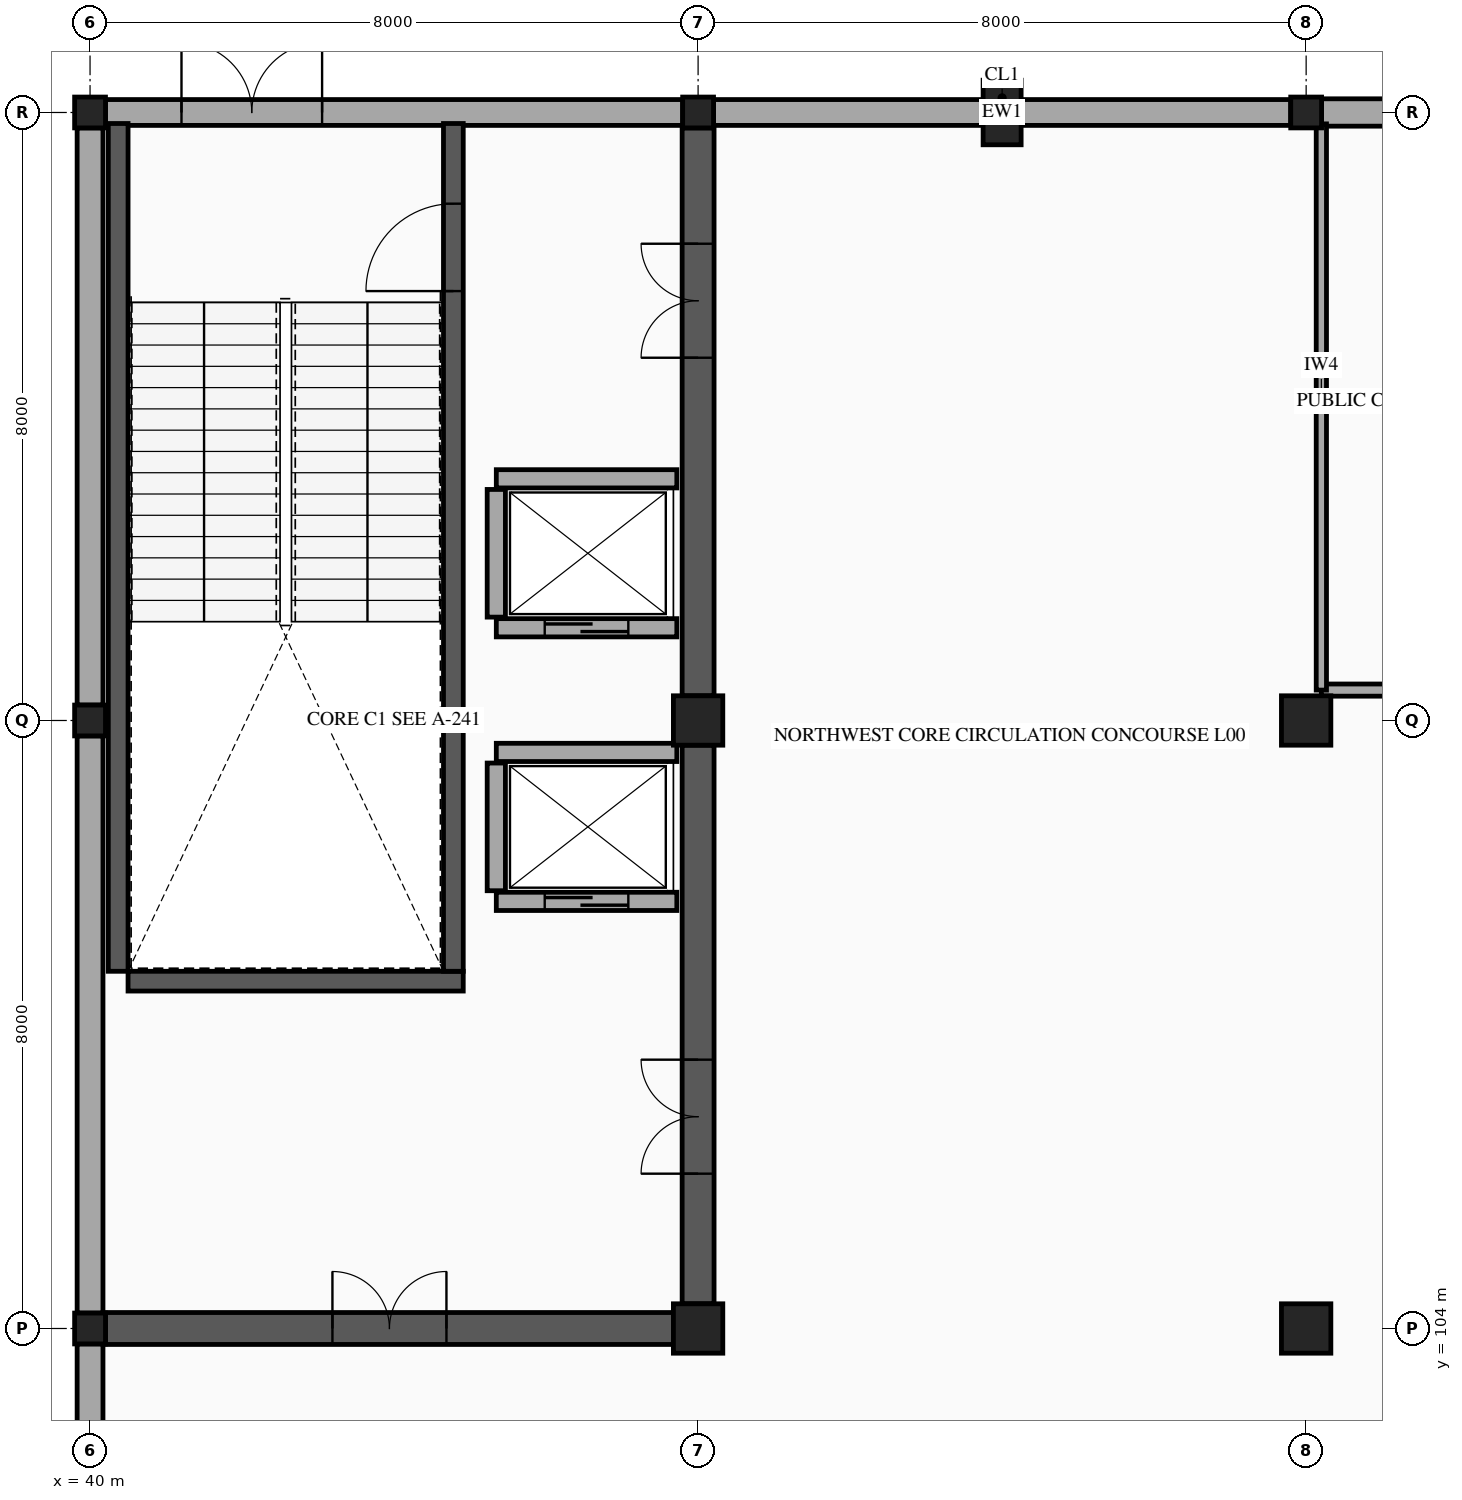
"""IFC4 building model, lengths in metres.
Left out: names, types, materials, properties, quantities, classifications, styles, units other than length and angle.
Written with IfcOpenShell. Run it as: python <this file> out.ifc"""

import sys

from ifc_helpers import new_model, si_unit, direction, frame, frame_2d, origin, origin_2d, place, context, subcontext, project, spatial, rectangle, hollow_rectangle, extrude, element, fill, save


model = new_model("IFC4")
c1 = context("Model", 3, precision=1e-05, world=origin(), true_north=direction((0.0, 1.0)))
c2 = subcontext(c1, "Body", "Model", "MODEL_VIEW")
j1 = project(units=[si_unit("LENGTHUNIT", "METRE"), si_unit("PLANEANGLEUNIT", "RADIAN")], contexts=[c1])
p1 = place(None, origin())
s1 = spatial("IfcSite", under=j1, at=p1, CompositionType="ELEMENT")
p2 = place(p1, origin())
s2 = spatial("IfcBuilding", under=s1, at=p2, CompositionType="ELEMENT")
p3 = place(p2, origin())
s3 = spatial("IfcBuildingStorey", under=s2, at=p3, CompositionType="ELEMENT", Elevation=0.0)
for number, where, z_axis, x_axis in (
    (1, (40.0, 104.0, 0.0), (0.0, 0.0, 1.0), (1.0, 0.0, 0.0)),
    (2, (40.0, 112.0, 0.0), (0.0, 0.0, 1.0), (1.0, 0.0, 0.0)),
    (3, (40.0, 120.0, 0.0), (0.0, 0.0, 1.0), (1.0, 0.0, 0.0)),
):
    element("IfcColumn", number, at=place(p3, frame(where, z_axis=z_axis, x_axis=x_axis)), inside=s3, PredefinedType="COLUMN", context=c2, shape_type="SweptSolid", body=[
        extrude(hollow_rectangle(XDim=0.406, YDim=0.406, WallThickness=0.015, InnerFilletRadius=0.015, OuterFilletRadius=0.029, at=origin_2d()), origin(), (0.0, 0.0, 1.0), 5.6),
    ])
for number, where, z_axis, x_axis in (
    (4, (48.0, 104.0, 0.0), (0.0, 0.0, 1.0), (1.0, 0.0, 0.0)),
    (5, (48.0, 112.0, 0.0), (0.0, 0.0, 1.0), (1.0, 0.0, 0.0)),
):
    element("IfcColumn", number, at=place(p3, frame(where, z_axis=z_axis, x_axis=x_axis)), inside=s3, PredefinedType="COLUMN", context=c2, shape_type="SweptSolid", body=[
        extrude(rectangle(XDim=0.65, YDim=0.65, at=origin_2d()), origin(), (0.0, 0.0, 1.0), 5.6),
    ])
p4 = place(p3, frame((48.0, 120.0, 0.0), z_axis=(0.0, 0.0, 1.0), x_axis=(1.0, 0.0, 0.0)))
e6 = element("IfcColumn", 6, at=p4, inside=s3, PredefinedType="COLUMN", context=c2, shape_type="SweptSolid", body=[
    extrude(hollow_rectangle(XDim=0.406, YDim=0.406, WallThickness=0.015, InnerFilletRadius=0.015, OuterFilletRadius=0.029, at=origin_2d()), origin(), (0.0, 0.0, 1.0), 5.6),
])
for number, where, z_axis, x_axis in (
    (7, (56.0, 104.0, 0.0), (0.0, 0.0, 1.0), (1.0, 0.0, 0.0)),
    (8, (56.0, 112.0, 0.0), (0.0, 0.0, 1.0), (1.0, 0.0, 0.0)),
):
    element("IfcColumn", number, at=place(p3, frame(where, z_axis=z_axis, x_axis=x_axis)), inside=s3, PredefinedType="COLUMN", context=c2, shape_type="SweptSolid", body=[
        extrude(rectangle(XDim=0.65, YDim=0.65, at=origin_2d()), origin(), (0.0, 0.0, 1.0), 5.6),
    ])
p5 = place(p3, frame((56.0, 120.0, 0.0), z_axis=(0.0, 0.0, 1.0), x_axis=(1.0, 0.0, 0.0)))
e9 = element("IfcColumn", 9, at=p5, inside=s3, PredefinedType="COLUMN", context=c2, shape_type="SweptSolid", body=[
    extrude(hollow_rectangle(XDim=0.406, YDim=0.406, WallThickness=0.015, InnerFilletRadius=0.015, OuterFilletRadius=0.029, at=origin_2d()), origin(), (0.0, 0.0, 1.0), 5.6),
])
p6 = place(p3, frame((52.0, 120.0, 0.0), z_axis=(0.0, 0.0, 1.0), x_axis=(1.0, 0.0, 0.0)))
e10 = element("IfcColumn", 10, at=p6, inside=s3, PredefinedType="PILASTER", context=c2, shape_type="SweptSolid", body=[
    extrude(rectangle(XDim=0.5, YDim=0.85, at=origin_2d()), origin(), (0.0, 0.0, 1.0), 5.6),
])
p7 = place(p3, frame((40.0, 96.203, 0.0), z_axis=(0.0, 0.0, 1.0), x_axis=(0.0, 1.0, 0.0)))
e11 = element("IfcWall", 11, at=p7, inside=s3, PredefinedType="STANDARD", context=c2, shape_type="SweptSolid", body=[
    extrude(rectangle(XDim=7.594, YDim=0.34, at=frame_2d((3.797, 0.0))), origin(), (0.0, 0.0, 1.0), 4.58),
])
p8 = place(p7, frame((2.897, 0.0, 0.0)))
e12 = element("IfcOpeningElement", 12, at=p8, cuts=e11, PredefinedType="OPENING", context=c2, shape_type="SweptSolid", body=[
    extrude(rectangle(XDim=1.8, YDim=2.3, at=frame_2d((0.9, 1.15))), frame((0.0, 0.18, 0.0), z_axis=(0.0, -1.0, 0.0), x_axis=(1.0, 0.0, 0.0)), (0.0, 0.0, 1.0), 0.36),
])
for number, where, z_axis, x_axis in (
    (13, (40.0, 104.203, 0.0), (0.0, 0.0, 1.0), (0.0, 1.0, 0.0)),
    (14, (40.0, 112.203, 0.0), (0.0, 0.0, 1.0), (0.0, 1.0, 0.0)),
):
    element("IfcWall", number, at=place(p3, frame(where, z_axis=z_axis, x_axis=x_axis)), inside=s3, PredefinedType="STANDARD", context=c2, shape_type="SweptSolid", body=[
        extrude(rectangle(XDim=7.594, YDim=0.34, at=frame_2d((3.797, 0.0))), origin(), (0.0, 0.0, 1.0), 4.58),
    ])
p9 = place(p3, frame((40.203, 120.0, 0.0), z_axis=(0.0, 0.0, 1.0), x_axis=(1.0, 0.0, 0.0)))
e15 = element("IfcWall", 15, at=p9, inside=s3, PredefinedType="STANDARD", context=c2, shape_type="SweptSolid", body=[
    extrude(rectangle(XDim=7.594, YDim=0.34, at=frame_2d((3.797, 0.0))), origin(), (0.0, 0.0, 1.0), 4.58),
])
p10 = place(p9, frame((1.0, 0.0, 0.0)))
e16 = element("IfcOpeningElement", 16, at=p10, cuts=e15, PredefinedType="OPENING", context=c2, shape_type="SweptSolid", body=[
    extrude(rectangle(XDim=1.85, YDim=2.2, at=frame_2d((0.925, 1.1))), frame((0.0, 0.18, 0.0), z_axis=(0.0, -1.0, 0.0), x_axis=(1.0, 0.0, 0.0)), (0.0, 0.0, 1.0), 0.36),
])
p11 = place(p3, frame((48.203, 120.0, 0.0), z_axis=(0.0, 0.0, 1.0), x_axis=(1.0, 0.0, 0.0)))
e17 = element("IfcWall", 17, at=p11, inside=s3, PredefinedType="STANDARD", context=c2, shape_type="SweptSolid", body=[
    extrude(rectangle(XDim=7.594, YDim=0.34, at=frame_2d((3.797, 0.0))), origin(), (0.0, 0.0, 1.0), 4.58),
])
p12 = place(p3, frame((56.203, 120.0, 0.0), z_axis=(0.0, 0.0, 1.0), x_axis=(1.0, 0.0, 0.0)))
e18 = element("IfcWall", 18, at=p12, inside=s3, PredefinedType="SOLIDWALL", context=c2, shape_type="SweptSolid", body=[
    extrude(rectangle(XDim=7.594, YDim=0.36, at=frame_2d((3.797, 0.0))), origin(), (0.0, 0.0, 1.0), 4.58),
])
p13 = place(p3, frame((40.5, 108.57, 0.0), z_axis=(0.0, 0.0, 1.0), x_axis=(1.0, 0.0, 0.0)))
e19 = element("IfcWall", 19, at=p13, inside=s3, PredefinedType="SHEAR", context=c2, shape_type="SweptSolid", body=[
    extrude(rectangle(XDim=4.41, YDim=0.26, at=frame_2d((2.205, 0.0))), origin(), (0.0, 0.0, 1.0), 5.38),
])
p14 = place(p3, frame((40.37, 108.7, 0.0), z_axis=(0.0, 0.0, 1.0), x_axis=(0.0, 1.0, 0.0)))
e20 = element("IfcWall", 20, at=p14, inside=s3, PredefinedType="SHEAR", context=c2, shape_type="SweptSolid", body=[
    extrude(rectangle(XDim=11.155, YDim=0.26, at=frame_2d((5.578, 0.0))), origin(), (0.0, 0.0, 1.0), 5.38),
])
p15 = place(p3, frame((44.78, 108.7, 0.0), z_axis=(0.0, 0.0, 1.0), x_axis=(0.0, 1.0, 0.0)))
e21 = element("IfcWall", 21, at=p15, inside=s3, PredefinedType="SHEAR", context=c2, shape_type="SweptSolid", body=[
    extrude(rectangle(XDim=11.155, YDim=0.26, at=frame_2d((5.578, 0.0))), origin(), (0.0, 0.0, 1.0), 5.38),
])
p16 = place(p15, frame((8.95, 0.0, 0.0)))
e22 = element("IfcOpeningElement", 22, at=p16, cuts=e21, PredefinedType="OPENING", context=c2, shape_type="SweptSolid", body=[
    extrude(rectangle(XDim=1.15, YDim=2.15, at=frame_2d((0.575, 1.075))), frame((0.0, 0.14, 0.0), z_axis=(0.0, -1.0, 0.0), x_axis=(1.0, 0.0, 0.0)), (0.0, 0.0, 1.0), 0.28),
])
p17 = place(p3, frame((40.203, 104.0, 0.0), z_axis=(0.0, 0.0, 1.0), x_axis=(1.0, 0.0, 0.0)))
e23 = element("IfcWall", 23, at=p17, inside=s3, PredefinedType="SHEAR", context=c2, shape_type="SweptSolid", body=[
    extrude(rectangle(XDim=7.472, YDim=0.42, at=frame_2d((3.736, 0.0))), origin(), (0.0, 0.0, 1.0), 5.38),
])
p18 = place(p17, frame((2.986, 0.0, 0.0)))
e24 = element("IfcOpeningElement", 24, at=p18, cuts=e23, PredefinedType="OPENING", context=c2, shape_type="SweptSolid", body=[
    extrude(rectangle(XDim=1.5, YDim=2.15, at=frame_2d((0.75, 1.075))), frame((0.0, 0.22, 0.0), z_axis=(0.0, -1.0, 0.0), x_axis=(1.0, 0.0, 0.0)), (0.0, 0.0, 1.0), 0.44),
])
p19 = place(p3, frame((48.0, 104.325, 0.0), z_axis=(0.0, 0.0, 1.0), x_axis=(0.0, 1.0, 0.0)))
e25 = element("IfcWall", 25, at=p19, inside=s3, PredefinedType="SHEAR", context=c2, shape_type="SweptSolid", body=[
    extrude(rectangle(XDim=7.35, YDim=0.42, at=frame_2d((3.675, 0.0))), origin(), (0.0, 0.0, 1.0), 5.38),
])
p20 = place(p19, frame((1.712, 0.0, 0.0)))
e26 = element("IfcOpeningElement", 26, at=p20, cuts=e25, PredefinedType="OPENING", context=c2, shape_type="SweptSolid", body=[
    extrude(rectangle(XDim=1.5, YDim=2.15, at=frame_2d((0.75, 1.075))), frame((0.0, 0.22, 0.0), z_axis=(0.0, -1.0, 0.0), x_axis=(1.0, 0.0, 0.0)), (0.0, 0.0, 1.0), 0.44),
])
p21 = place(p3, frame((48.0, 112.325, 0.0), z_axis=(0.0, 0.0, 1.0), x_axis=(0.0, 1.0, 0.0)))
e27 = element("IfcWall", 27, at=p21, inside=s3, PredefinedType="SHEAR", context=c2, shape_type="SweptSolid", body=[
    extrude(rectangle(XDim=7.472, YDim=0.42, at=frame_2d((3.736, 0.0))), origin(), (0.0, 0.0, 1.0), 5.38),
])
p22 = place(p21, frame((4.448, 0.0, 0.0)))
e28 = element("IfcOpeningElement", 28, at=p22, cuts=e27, PredefinedType="OPENING", context=c2, shape_type="SweptSolid", body=[
    extrude(rectangle(XDim=1.5, YDim=2.15, at=frame_2d((0.75, 1.075))), frame((0.0, 0.22, 0.0), z_axis=(0.0, -1.0, 0.0), x_axis=(1.0, 0.0, 0.0)), (0.0, 0.0, 1.0), 0.44),
])
p23 = place(p3, frame((45.345, 113.22, 0.0), z_axis=(0.0, 0.0, 1.0), x_axis=(1.0, 0.0, 0.0)))
e29 = element("IfcWall", 29, at=p23, inside=s3, PredefinedType="PARTITIONING", context=c2, shape_type="SweptSolid", body=[
    extrude(rectangle(XDim=2.375, YDim=0.24, at=frame_2d((1.188, 0.0))), origin(), (0.0, 0.0, 1.0), 5.38),
])
p24 = place(p23, frame((0.637, 0.0, 0.0)))
e30 = element("IfcOpeningElement", 30, at=p24, cuts=e29, PredefinedType="OPENING", context=c2, shape_type="SweptSolid", body=[
    extrude(rectangle(XDim=1.1, YDim=2.15, at=frame_2d((0.55, 1.075))), frame((0.0, 0.13, 0.0), z_axis=(0.0, -1.0, 0.0), x_axis=(1.0, 0.0, 0.0)), (0.0, 0.0, 1.0), 0.26),
])
p25 = place(p3, frame((45.345, 115.18, 0.0), z_axis=(0.0, 0.0, 1.0), x_axis=(1.0, 0.0, 0.0)))
e31 = element("IfcWall", 31, at=p25, inside=s3, PredefinedType="PARTITIONING", context=c2, shape_type="SweptSolid", body=[
    extrude(rectangle(XDim=2.375, YDim=0.24, at=frame_2d((1.188, 0.0))), origin(), (0.0, 0.0, 1.0), 5.38),
])
p26 = place(p3, frame((45.345, 113.36, 0.0), z_axis=(0.0, 0.0, 1.0), x_axis=(0.0, 1.0, 0.0)))
e32 = element("IfcWall", 32, at=p26, inside=s3, PredefinedType="PARTITIONING", context=c2, shape_type="SweptSolid", body=[
    extrude(rectangle(XDim=1.68, YDim=0.24, at=frame_2d((0.84, 0.0))), origin(), (0.0, 0.0, 1.0), 5.38),
])
p27 = place(p3, frame((45.345, 109.62, 0.0), z_axis=(0.0, 0.0, 1.0), x_axis=(1.0, 0.0, 0.0)))
e33 = element("IfcWall", 33, at=p27, inside=s3, PredefinedType="PARTITIONING", context=c2, shape_type="SweptSolid", body=[
    extrude(rectangle(XDim=2.375, YDim=0.24, at=frame_2d((1.188, 0.0))), origin(), (0.0, 0.0, 1.0), 5.38),
])
p28 = place(p27, frame((0.637, 0.0, 0.0)))
e34 = element("IfcOpeningElement", 34, at=p28, cuts=e33, PredefinedType="OPENING", context=c2, shape_type="SweptSolid", body=[
    extrude(rectangle(XDim=1.1, YDim=2.15, at=frame_2d((0.55, 1.075))), frame((0.0, 0.13, 0.0), z_axis=(0.0, -1.0, 0.0), x_axis=(1.0, 0.0, 0.0)), (0.0, 0.0, 1.0), 0.26),
])
p29 = place(p3, frame((45.345, 111.58, 0.0), z_axis=(0.0, 0.0, 1.0), x_axis=(1.0, 0.0, 0.0)))
e35 = element("IfcWall", 35, at=p29, inside=s3, PredefinedType="PARTITIONING", context=c2, shape_type="SweptSolid", body=[
    extrude(rectangle(XDim=2.375, YDim=0.24, at=frame_2d((1.188, 0.0))), origin(), (0.0, 0.0, 1.0), 5.38),
])
p30 = place(p3, frame((45.345, 109.76, 0.0), z_axis=(0.0, 0.0, 1.0), x_axis=(0.0, 1.0, 0.0)))
e36 = element("IfcWall", 36, at=p30, inside=s3, PredefinedType="PARTITIONING", context=c2, shape_type="SweptSolid", body=[
    extrude(rectangle(XDim=1.68, YDim=0.24, at=frame_2d((0.84, 0.0))), origin(), (0.0, 0.0, 1.0), 5.38),
])
p31 = place(p3, frame((56.2, 112.4, 0.0), z_axis=(0.0, 0.0, 1.0), x_axis=(1.0, 0.0, 0.0)))
e37 = element("IfcWall", 37, at=p31, inside=s3, PredefinedType="PARTITIONING", context=c2, shape_type="SweptSolid", body=[
    extrude(rectangle(XDim=4.7, YDim=0.16, at=frame_2d((2.35, 0.0))), origin(), (0.0, 0.0, 1.0), 4.58),
])
p32 = place(p31, frame((3.193, 0.0, 0.0)))
e38 = element("IfcOpeningElement", 38, at=p32, cuts=e37, PredefinedType="OPENING", context=c2, shape_type="SweptSolid", body=[
    extrude(rectangle(XDim=0.92, YDim=2.1, at=frame_2d((0.46, 1.05))), frame((0.0, 0.09, 0.0), z_axis=(0.0, -1.0, 0.0), x_axis=(1.0, 0.0, 0.0)), (0.0, 0.0, 1.0), 0.18),
])
p33 = place(p3, frame((56.2, 112.4, 0.0), z_axis=(0.0, 0.0, 1.0), x_axis=(0.0, 1.0, 0.0)))
e39 = element("IfcWall", 39, at=p33, inside=s3, PredefinedType="PARTITIONING", context=c2, shape_type="SweptSolid", body=[
    extrude(rectangle(XDim=7.45, YDim=0.135, at=frame_2d((3.725, 0.0))), origin(), (0.0, 0.0, 1.0), 4.58),
])
p34 = place(p10, origin())
e40 = element("IfcDoor", 40, at=p34, inside=s3, OperationType="DOUBLE_DOOR_SINGLE_SWING", PredefinedType="DOOR", context=c2, shape_type="SweptSolid", body=[
    extrude(rectangle(XDim=1.85, YDim=2.2, at=frame_2d((0.925, 1.1))), frame((0.0, 0.025, 0.0), z_axis=(0.0, -1.0, 0.0), x_axis=(1.0, 0.0, 0.0)), (0.0, 0.0, 1.0), 0.05),
])
fill(e16, e40)
p35 = place(p16, origin())
e41 = element("IfcDoor", 41, at=p35, inside=s3, OperationType="SINGLE_SWING_LEFT", PredefinedType="DOOR", context=c2, shape_type="SweptSolid", body=[
    extrude(rectangle(XDim=1.15, YDim=2.15, at=frame_2d((0.575, 1.075))), frame((0.0, 0.025, 0.0), z_axis=(0.0, -1.0, 0.0), x_axis=(1.0, 0.0, 0.0)), (0.0, 0.0, 1.0), 0.05),
])
fill(e22, e41)
p36 = place(p18, origin())
e42 = element("IfcDoor", 42, at=p36, inside=s3, OperationType="DOUBLE_DOOR_SINGLE_SWING", PredefinedType="DOOR", context=c2, shape_type="SweptSolid", body=[
    extrude(rectangle(XDim=1.5, YDim=2.15, at=frame_2d((0.75, 1.075))), frame((0.0, 0.025, 0.0), z_axis=(0.0, -1.0, 0.0), x_axis=(1.0, 0.0, 0.0)), (0.0, 0.0, 1.0), 0.05),
])
fill(e24, e42)
p37 = place(p20, origin())
e43 = element("IfcDoor", 43, at=p37, inside=s3, OperationType="DOUBLE_DOOR_SINGLE_SWING", PredefinedType="DOOR", context=c2, shape_type="SweptSolid", body=[
    extrude(rectangle(XDim=1.5, YDim=2.15, at=frame_2d((0.75, 1.075))), frame((0.0, 0.025, 0.0), z_axis=(0.0, -1.0, 0.0), x_axis=(1.0, 0.0, 0.0)), (0.0, 0.0, 1.0), 0.05),
])
fill(e26, e43)
p38 = place(p22, origin())
e44 = element("IfcDoor", 44, at=p38, inside=s3, OperationType="DOUBLE_DOOR_SINGLE_SWING", PredefinedType="DOOR", context=c2, shape_type="SweptSolid", body=[
    extrude(rectangle(XDim=1.5, YDim=2.15, at=frame_2d((0.75, 1.075))), frame((0.0, 0.025, 0.0), z_axis=(0.0, -1.0, 0.0), x_axis=(1.0, 0.0, 0.0)), (0.0, 0.0, 1.0), 0.05),
])
fill(e28, e44)
p39 = place(p24, origin())
e45 = element("IfcDoor", 45, at=p39, inside=s3, OperationType="SLIDING_TO_LEFT", PredefinedType="DOOR", context=c2, shape_type="SweptSolid", body=[
    extrude(rectangle(XDim=1.1, YDim=2.15, at=frame_2d((0.55, 1.075))), frame((0.0, 0.025, 0.0), z_axis=(0.0, -1.0, 0.0), x_axis=(1.0, 0.0, 0.0)), (0.0, 0.0, 1.0), 0.05),
])
fill(e30, e45)
p40 = place(p28, origin())
e46 = element("IfcDoor", 46, at=p40, inside=s3, OperationType="SLIDING_TO_LEFT", PredefinedType="DOOR", context=c2, shape_type="SweptSolid", body=[
    extrude(rectangle(XDim=1.1, YDim=2.15, at=frame_2d((0.55, 1.075))), frame((0.0, 0.025, 0.0), z_axis=(0.0, -1.0, 0.0), x_axis=(1.0, 0.0, 0.0)), (0.0, 0.0, 1.0), 0.05),
])
fill(e34, e46)
save(model, sys.argv[1])
